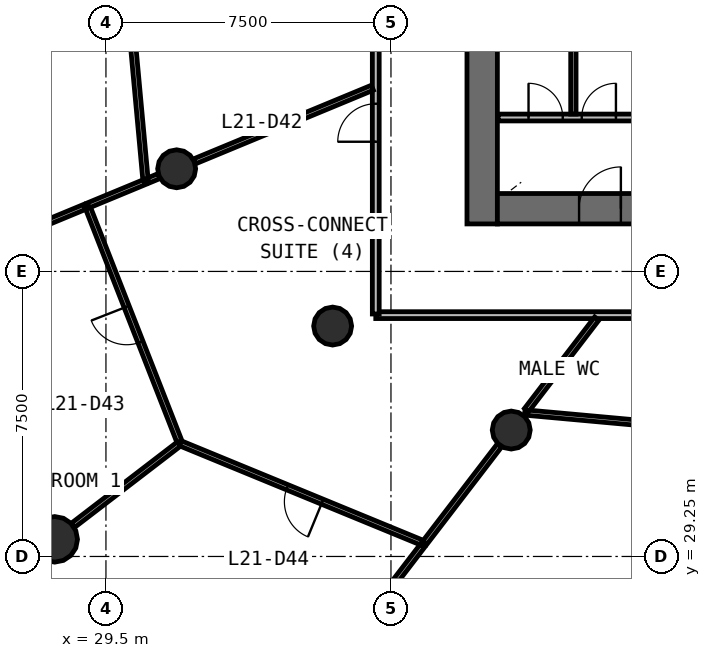
"""IFC4 building model, lengths in metres.
Left out: names, types, materials, properties, quantities, classifications, styles, units other than length and angle.
Written with IfcOpenShell. Run it as: python <this file> out.ifc"""

import sys

from ifc_helpers import new_model, si_unit, direction, frame, frame_2d, origin, origin_2d, place, context, subcontext, project, spatial, rectangle, circle, extrude, source, transform, mapped, element, fill, save


model = new_model("IFC4")
c1 = context("Model", 3, precision=1e-05, world=origin(), true_north=direction((0.0, 1.0)))
c2 = subcontext(c1, "Body", "Model", "MODEL_VIEW")
j1 = project(units=[si_unit("LENGTHUNIT", "METRE"), si_unit("PLANEANGLEUNIT", "RADIAN")], contexts=[c1])
p1 = place(None, origin())
s1 = spatial("IfcSite", under=j1, at=p1, CompositionType="ELEMENT")
p2 = place(p1, origin())
s2 = spatial("IfcBuilding", under=s1, at=p2, CompositionType="ELEMENT")
p3 = place(p2, frame((0.0, 0.0, 92.1)))
s3 = spatial("IfcBuildingStorey", under=s2, at=p3, CompositionType="ELEMENT", Elevation=92.1)
p4 = place(p3, frame((39.4, 58.0, 0.0), z_axis=(0.0, 0.0, 1.0), x_axis=(0.0, -1.0, 0.0)))
e1 = element("IfcWall", 1, at=p4, inside=s3, PredefinedType="SHEAR", context=c2, shape_type="SweptSolid", body=[
    extrude(rectangle(XDim=20.0, YDim=0.8, at=frame_2d((10.0, 0.0))), origin(), (0.0, 0.0, 1.0), 4.1),
])
p5 = place(p4, frame((9.1, 0.0, 0.0)))
e2 = element("IfcOpeningElement", 2, at=p5, cuts=e1, PredefinedType="OPENING", context=c2, shape_type="SweptSolid", body=[
    extrude(rectangle(XDim=1.8, YDim=2.1, at=frame_2d((0.9, 1.05))), frame((0.0, 0.41, 0.0), z_axis=(0.0, -1.0, 0.0), x_axis=(1.0, 0.0, 0.0)), (0.0, 0.0, 1.0), 0.82),
])
p6 = place(p3, frame((39.8, 38.4, 0.0), z_axis=(0.0, 0.0, 1.0), x_axis=(1.0, 0.0, 0.0)))
e3 = element("IfcWall", 3, at=p6, inside=s3, PredefinedType="SHEAR", context=c2, shape_type="SweptSolid", body=[
    extrude(rectangle(XDim=24.4, YDim=0.8, at=frame_2d((12.2, 0.0))), origin(), (0.0, 0.0, 1.0), 4.1),
])
p7 = place(p6, frame((21.65, 0.0, 0.0)))
e4 = element("IfcOpeningElement", 4, at=p7, cuts=e3, PredefinedType="OPENING", context=c2, shape_type="SweptSolid", body=[
    extrude(rectangle(XDim=1.1, YDim=2.1, at=frame_2d((0.55, 1.05))), frame((0.0, 0.41, 0.0), z_axis=(0.0, -1.0, 0.0), x_axis=(1.0, 0.0, 0.0)), (0.0, 0.0, 1.0), 0.82),
])
p8 = place(p6, frame((2.15, 0.0, 0.0)))
e5 = element("IfcOpeningElement", 5, at=p8, cuts=e3, PredefinedType="OPENING", context=c2, shape_type="SweptSolid", body=[
    extrude(rectangle(XDim=1.1, YDim=2.1, at=frame_2d((0.55, 1.05))), frame((0.0, 0.41, 0.0), z_axis=(0.0, -1.0, 0.0), x_axis=(1.0, 0.0, 0.0)), (0.0, 0.0, 1.0), 0.82),
])
m1 = source(origin(), c2, "Body", "SweptSolid", [
    extrude(circle(Radius=0.6, at=origin_2d()), origin(), (0.0, 0.0, 1.0), 4.1),
])
p9 = place(p3, frame((28.152, 29.701, 0.0), z_axis=(0.0, 0.0, 1.0), x_axis=(1.0, 0.0, 0.0)))
e6 = element("IfcColumn", 6, at=p9, inside=s3, PredefinedType="COLUMN", context=c2, shape_type="MappedRepresentation", body=[
    mapped(m1, transform((0.0, 0.0, 0.0), scale=1.0)),
])
m2 = source(origin(), c2, "Body", "SweptSolid", [
    extrude(circle(Radius=0.5, at=origin_2d()), origin(), (0.0, 0.0, 1.0), 4.1),
])
for number, where, z_axis, x_axis in (
    (7, (31.361, 39.451, 0.0), (0.0, 0.0, 1.0), (1.0, 0.0, 0.0)),
    (8, (35.465, 35.312, 0.0), (0.0, 0.0, 1.0), (1.0, 0.0, 0.0)),
    (9, (40.165, 32.576, 0.0), (0.0, 0.0, 1.0), (1.0, 0.0, 0.0)),
):
    element("IfcColumn", number, at=place(p3, frame(where, z_axis=z_axis, x_axis=x_axis)), inside=s3, PredefinedType="COLUMN", context=c2, shape_type="MappedRepresentation", body=[
        mapped(m2, transform((0.0, 0.0, 0.0), scale=1.0)),
    ])
p10 = place(p3, frame((67.4, 35.6, 0.0), z_axis=(0.0, 0.0, 1.0), x_axis=(-1.0, 0.0, 0.0)))
e10 = element("IfcWall", 10, at=p10, inside=s3, PredefinedType="PARTITIONING", context=c2, shape_type="SweptSolid", body=[
    extrude(rectangle(XDim=30.8, YDim=0.18, at=frame_2d((15.4, 0.0))), origin(), (0.0, 0.0, 1.0), 2.9),
])
p11 = place(p10, frame((22.25, 0.0, 0.0)))
e11 = element("IfcOpeningElement", 11, at=p11, cuts=e10, PredefinedType="OPENING", context=c2, shape_type="SweptSolid", body=[
    extrude(rectangle(XDim=0.9, YDim=2.1, at=frame_2d((0.45, 1.05))), frame((0.0, 0.1, 0.0), z_axis=(0.0, -1.0, 0.0), x_axis=(1.0, 0.0, 0.0)), (0.0, 0.0, 1.0), 0.2),
])
p12 = place(p10, frame((19.65, 0.0, 0.0)))
e12 = element("IfcOpeningElement", 12, at=p12, cuts=e10, PredefinedType="OPENING", context=c2, shape_type="SweptSolid", body=[
    extrude(rectangle(XDim=0.9, YDim=2.1, at=frame_2d((0.45, 1.05))), frame((0.0, 0.1, 0.0), z_axis=(0.0, -1.0, 0.0), x_axis=(1.0, 0.0, 0.0)), (0.0, 0.0, 1.0), 0.2),
])
p13 = place(p10, frame((17.25, 0.0, 0.0)))
e13 = element("IfcOpeningElement", 13, at=p13, cuts=e10, PredefinedType="OPENING", context=c2, shape_type="SweptSolid", body=[
    extrude(rectangle(XDim=0.9, YDim=2.1, at=frame_2d((0.45, 1.05))), frame((0.0, 0.1, 0.0), z_axis=(0.0, -1.0, 0.0), x_axis=(1.0, 0.0, 0.0)), (0.0, 0.0, 1.0), 0.2),
])
p14 = place(p10, frame((14.95, 0.0, 0.0)))
e14 = element("IfcOpeningElement", 14, at=p14, cuts=e10, PredefinedType="OPENING", context=c2, shape_type="SweptSolid", body=[
    extrude(rectangle(XDim=1.0, YDim=2.1, at=frame_2d((0.5, 1.05))), frame((0.0, 0.1, 0.0), z_axis=(0.0, -1.0, 0.0), x_axis=(1.0, 0.0, 0.0)), (0.0, 0.0, 1.0), 0.2),
])
p15 = place(p10, frame((4.35, 0.0, 0.0)))
e15 = element("IfcOpeningElement", 15, at=p15, cuts=e10, PredefinedType="OPENING", context=c2, shape_type="SweptSolid", body=[
    extrude(rectangle(XDim=1.0, YDim=2.1, at=frame_2d((0.5, 1.05))), frame((0.0, 0.1, 0.0), z_axis=(0.0, -1.0, 0.0), x_axis=(1.0, 0.0, 0.0)), (0.0, 0.0, 1.0), 0.2),
])
p16 = place(p3, frame((36.6, 35.63, 0.0), z_axis=(0.0, 0.0, 1.0), x_axis=(0.0, 1.0, 0.0)))
e16 = element("IfcWall", 16, at=p16, inside=s3, PredefinedType="PARTITIONING", context=c2, shape_type="SweptSolid", body=[
    extrude(rectangle(XDim=23.583, YDim=0.18, at=frame_2d((11.791, 0.0))), origin(), (0.0, 0.0, 1.0), 2.9),
])
p17 = place(p16, frame((11.333, 0.0, 0.0)))
e17 = element("IfcOpeningElement", 17, at=p17, cuts=e16, PredefinedType="OPENING", context=c2, shape_type="SweptSolid", body=[
    extrude(rectangle(XDim=1.0, YDim=2.1, at=frame_2d((0.5, 1.05))), frame((0.0, 0.1, 0.0), z_axis=(0.0, -1.0, 0.0), x_axis=(1.0, 0.0, 0.0)), (0.0, 0.0, 1.0), 0.2),
])
p18 = place(p16, frame((4.532, 0.0, 0.0)))
e18 = element("IfcOpeningElement", 18, at=p18, cuts=e16, PredefinedType="OPENING", context=c2, shape_type="SweptSolid", body=[
    extrude(rectangle(XDim=1.0, YDim=2.1, at=frame_2d((0.5, 1.05))), frame((0.0, 0.1, 0.0), z_axis=(0.0, -1.0, 0.0), x_axis=(1.0, 0.0, 0.0)), (0.0, 0.0, 1.0), 0.2),
])
p19 = place(p3, frame((39.82, 40.8, 0.0), z_axis=(0.0, 0.0, 1.0), x_axis=(1.0, 0.0, 0.0)))
e19 = element("IfcWall", 19, at=p19, inside=s3, PredefinedType="PARTITIONING", context=c2, shape_type="SweptSolid", body=[
    extrude(rectangle(XDim=3.95, YDim=0.18, at=frame_2d((1.975, 0.0))), origin(), (0.0, 0.0, 1.0), 3.7),
])
p20 = place(p19, frame((0.8, 0.0, 0.0)))
e20 = element("IfcOpeningElement", 20, at=p20, cuts=e19, PredefinedType="OPENING", context=c2, shape_type="SweptSolid", body=[
    extrude(rectangle(XDim=0.9, YDim=2.1, at=frame_2d((0.45, 1.05))), frame((0.0, 0.1, 0.0), z_axis=(0.0, -1.0, 0.0), x_axis=(1.0, 0.0, 0.0)), (0.0, 0.0, 1.0), 0.2),
])
p21 = place(p19, frame((2.2, 0.0, 0.0)))
e21 = element("IfcOpeningElement", 21, at=p21, cuts=e19, PredefinedType="OPENING", context=c2, shape_type="SweptSolid", body=[
    extrude(rectangle(XDim=0.9, YDim=2.1, at=frame_2d((0.45, 1.05))), frame((0.0, 0.1, 0.0), z_axis=(0.0, -1.0, 0.0), x_axis=(1.0, 0.0, 0.0)), (0.0, 0.0, 1.0), 0.2),
])
p22 = place(p3, frame((37.873, 29.59, 0.0), z_axis=(0.0, 0.0, 1.0), x_axis=(-0.92486289716, 0.380300698733, 0.0)))
e22 = element("IfcWall", 22, at=p22, inside=s3, PredefinedType="PARTITIONING", context=c2, shape_type="SweptSolid", body=[
    extrude(rectangle(XDim=6.946, YDim=0.14, at=frame_2d((3.473, 0.0))), origin(), (0.0, 0.0, 1.0), 2.9),
])
p23 = place(p22, frame((2.896, 0.0, 0.0)))
e23 = element("IfcOpeningElement", 23, at=p23, cuts=e22, PredefinedType="OPENING", context=c2, shape_type="SweptSolid", body=[
    extrude(rectangle(XDim=1.0, YDim=2.1, at=frame_2d((0.5, 1.05))), frame((0.0, 0.08, 0.0), z_axis=(0.0, -1.0, 0.0), x_axis=(1.0, 0.0, 0.0)), (0.0, 0.0, 1.0), 0.16),
])
p24 = place(p3, frame((31.439, 32.259, 0.0), z_axis=(0.0, 0.0, 1.0), x_axis=(-0.364570341209, 0.931175851443, 0.0)))
e24 = element("IfcWall", 24, at=p24, inside=s3, PredefinedType="PARTITIONING", context=c2, shape_type="SweptSolid", body=[
    extrude(rectangle(XDim=6.675, YDim=0.14, at=frame_2d((3.338, 0.0))), origin(), (0.0, 0.0, 1.0), 2.9),
])
p25 = place(p24, frame((2.825, 0.0, 0.0)))
e25 = element("IfcOpeningElement", 25, at=p25, cuts=e24, PredefinedType="OPENING", context=c2, shape_type="SweptSolid", body=[
    extrude(rectangle(XDim=1.0, YDim=2.1, at=frame_2d((0.5, 1.05))), frame((0.0, 0.08, 0.0), z_axis=(0.0, -1.0, 0.0), x_axis=(1.0, 0.0, 0.0)), (0.0, 0.0, 1.0), 0.16),
])
p26 = place(p3, frame((29.993, 45.103, 0.0), z_axis=(0.0, 0.0, 1.0), x_axis=(0.091688453154, -0.995787742221, 0.0)))
e26 = element("IfcWall", 26, at=p26, inside=s3, PredefinedType="PARTITIONING", context=c2, shape_type="SweptSolid", body=[
    extrude(rectangle(XDim=6.015, YDim=0.14, at=frame_2d((3.008, 0.0))), origin(), (0.0, 0.0, 1.0), 2.9),
])
p27 = place(p3, frame((28.94, 38.448, 0.0), z_axis=(0.0, 0.0, 1.0), x_axis=(-0.923869625223, -0.382707349798, 0.0)))
e27 = element("IfcWall", 27, at=p27, inside=s3, PredefinedType="PARTITIONING", context=c2, shape_type="SweptSolid", body=[
    extrude(rectangle(XDim=5.236, YDim=0.14, at=frame_2d((2.618, 0.0))), origin(), (0.0, 0.0, 1.0), 2.9),
])
p28 = place(p3, frame((36.51, 41.584, 0.0), z_axis=(0.0, 0.0, 1.0), x_axis=(-0.923890025086, -0.382658100067, 0.0)))
e28 = element("IfcWall", 28, at=p28, inside=s3, PredefinedType="PARTITIONING", context=c2, shape_type="SweptSolid", body=[
    extrude(rectangle(XDim=5.068, YDim=0.14, at=frame_2d((2.534, 0.0))), origin(), (0.0, 0.0, 1.0), 2.9),
])
p29 = place(p3, frame((40.52, 33.039, 0.0), z_axis=(0.0, 0.0, 1.0), x_axis=(0.995896728673, -0.090496993423, 0.0)))
e29 = element("IfcWall", 29, at=p29, inside=s3, PredefinedType="PARTITIONING", context=c2, shape_type="SweptSolid", body=[
    extrude(rectangle(XDim=5.112, YDim=0.14, at=frame_2d((2.556, 0.0))), origin(), (0.0, 0.0, 1.0), 2.9),
])
p30 = place(p3, frame((37.829, 29.532, 0.0), z_axis=(0.0, 0.0, 1.0), x_axis=(-0.608729505252, -0.793377835231, 0.0)))
e30 = element("IfcWall", 30, at=p30, inside=s3, PredefinedType="PARTITIONING", context=c2, shape_type="SweptSolid", body=[
    extrude(rectangle(XDim=4.282, YDim=0.14, at=frame_2d((2.141, 0.0))), origin(), (0.0, 0.0, 1.0), 2.9),
])
p31 = place(p30, frame((1.65, 0.0, 0.0)))
e31 = element("IfcOpeningElement", 31, at=p31, cuts=e30, PredefinedType="OPENING", context=c2, shape_type="SweptSolid", body=[
    extrude(rectangle(XDim=1.0, YDim=2.1, at=frame_2d((0.5, 1.05))), frame((0.0, 0.08, 0.0), z_axis=(0.0, -1.0, 0.0), x_axis=(1.0, 0.0, 0.0)), (0.0, 0.0, 1.0), 0.16),
])
p32 = place(p3, frame((31.426, 32.213, 0.0), z_axis=(0.0, 0.0, 1.0), x_axis=(-0.793398837897, -0.608702130787, 0.0)))
e32 = element("IfcWall", 32, at=p32, inside=s3, PredefinedType="PARTITIONING", context=c2, shape_type="SweptSolid", body=[
    extrude(rectangle(XDim=3.523, YDim=0.14, at=frame_2d((1.761, 0.0))), origin(), (0.0, 0.0, 1.0), 2.9),
])
p33 = place(p3, frame((39.858, 32.176, 0.0), z_axis=(0.0, 0.0, 1.0), x_axis=(-0.608767895977, -0.79334837797, 0.0)))
e33 = element("IfcWall", 33, at=p33, inside=s3, PredefinedType="PARTITIONING", context=c2, shape_type="SweptSolid", body=[
    extrude(rectangle(XDim=3.23, YDim=0.14, at=frame_2d((1.615, 0.0))), origin(), (0.0, 0.0, 1.0), 2.9),
])
p34 = place(p3, frame((42.416, 35.51, 0.0), z_axis=(0.0, 0.0, 1.0), x_axis=(-0.608725669938, -0.793380777911, 0.0)))
e34 = element("IfcWall", 34, at=p34, inside=s3, PredefinedType="PARTITIONING", context=c2, shape_type="SweptSolid", body=[
    extrude(rectangle(XDim=3.032, YDim=0.14, at=frame_2d((1.516, 0.0))), origin(), (0.0, 0.0, 1.0), 2.9),
])
p35 = place(p3, frame((41.8, 40.89, 0.0), z_axis=(0.0, 0.0, 1.0), x_axis=(0.0, 1.0, 0.0)))
e35 = element("IfcWall", 35, at=p35, inside=s3, PredefinedType="PARTITIONING", context=c2, shape_type="SweptSolid", body=[
    extrude(rectangle(XDim=2.71, YDim=0.14, at=frame_2d((1.355, 0.0))), origin(), (0.0, 0.0, 1.0), 2.9),
])
p36 = place(p3, frame((30.517, 39.102, 0.0), z_axis=(0.0, 0.0, 1.0), x_axis=(-0.923924255361, -0.382575444006, 0.0)))
e36 = element("IfcWall", 36, at=p36, inside=s3, PredefinedType="PARTITIONING", context=c2, shape_type="SweptSolid", body=[
    extrude(rectangle(XDim=1.607, YDim=0.14, at=frame_2d((0.803, 0.0))), origin(), (0.0, 0.0, 1.0), 2.9),
])
p37 = place(p3, frame((30.894, 39.258, 0.0), z_axis=(0.0, 0.0, 1.0), x_axis=(-0.923645219799, -0.383248624188, 0.0)))
e37 = element("IfcWall", 37, at=p37, inside=s3, PredefinedType="PARTITIONING", context=c2, shape_type="SweptSolid", body=[
    extrude(rectangle(XDim=0.304, YDim=0.14, at=frame_2d((0.152, 0.0))), origin(), (0.0, 0.0, 1.0), 2.9),
])
m3 = source(origin(), c2, "Body", "SweptSolid", [
    extrude(rectangle(XDim=1.1, YDim=2.1, at=frame_2d((0.55, 1.05))), frame((0.0, 0.025, 0.0), z_axis=(0.0, -1.0, 0.0), x_axis=(1.0, 0.0, 0.0)), (0.0, 0.0, 1.0), 0.05),
])
p38 = place(p8, origin())
e38 = element("IfcDoor", 38, at=p38, inside=s3, OperationType="SINGLE_SWING_RIGHT", PredefinedType="DOOR", context=c2, shape_type="MappedRepresentation", body=[
    mapped(m3, transform((0.0, 0.0, 0.0), scale=1.0)),
])
fill(e5, e38)
m4 = source(origin(), c2, "Body", "SweptSolid", [
    extrude(rectangle(XDim=1.0, YDim=2.1, at=frame_2d((0.5, 1.05))), frame((0.0, 0.025, 0.0), z_axis=(0.0, -1.0, 0.0), x_axis=(1.0, 0.0, 0.0)), (0.0, 0.0, 1.0), 0.05),
])
p39 = place(p18, origin())
e39 = element("IfcDoor", 39, at=p39, inside=s3, OperationType="SINGLE_SWING_LEFT", PredefinedType="DOOR", context=c2, shape_type="MappedRepresentation", body=[
    mapped(m4, transform((0.0, 0.0, 0.0), scale=1.0)),
])
fill(e18, e39)
p40 = place(p25, origin())
e40 = element("IfcDoor", 40, at=p40, inside=s3, OperationType="SINGLE_SWING_RIGHT", PredefinedType="DOOR", context=c2, shape_type="MappedRepresentation", body=[
    mapped(m4, transform((0.0, 0.0, 0.0), scale=1.0)),
])
fill(e25, e40)
p41 = place(p23, origin())
e41 = element("IfcDoor", 41, at=p41, inside=s3, OperationType="SINGLE_SWING_LEFT", PredefinedType="DOOR", context=c2, shape_type="MappedRepresentation", body=[
    mapped(m4, transform((0.0, 0.0, 0.0), scale=1.0)),
])
fill(e23, e41)
m5 = source(origin(), c2, "Body", "SweptSolid", [
    extrude(rectangle(XDim=0.9, YDim=2.1, at=frame_2d((0.45, 1.05))), frame((0.0, 0.025, 0.0), z_axis=(0.0, -1.0, 0.0), x_axis=(1.0, 0.0, 0.0)), (0.0, 0.0, 1.0), 0.05),
])
p42 = place(p20, origin())
e42 = element("IfcDoor", 42, at=p42, inside=s3, OperationType="SINGLE_SWING_LEFT", PredefinedType="DOOR", context=c2, shape_type="MappedRepresentation", body=[
    mapped(m5, transform((0.0, 0.0, 0.0), scale=1.0)),
])
fill(e20, e42)
p43 = place(p21, origin())
e43 = element("IfcDoor", 43, at=p43, inside=s3, OperationType="SINGLE_SWING_RIGHT", PredefinedType="DOOR", context=c2, shape_type="MappedRepresentation", body=[
    mapped(m5, transform((0.0, 0.0, 0.0), scale=1.0)),
])
fill(e21, e43)
save(model, sys.argv[1])
